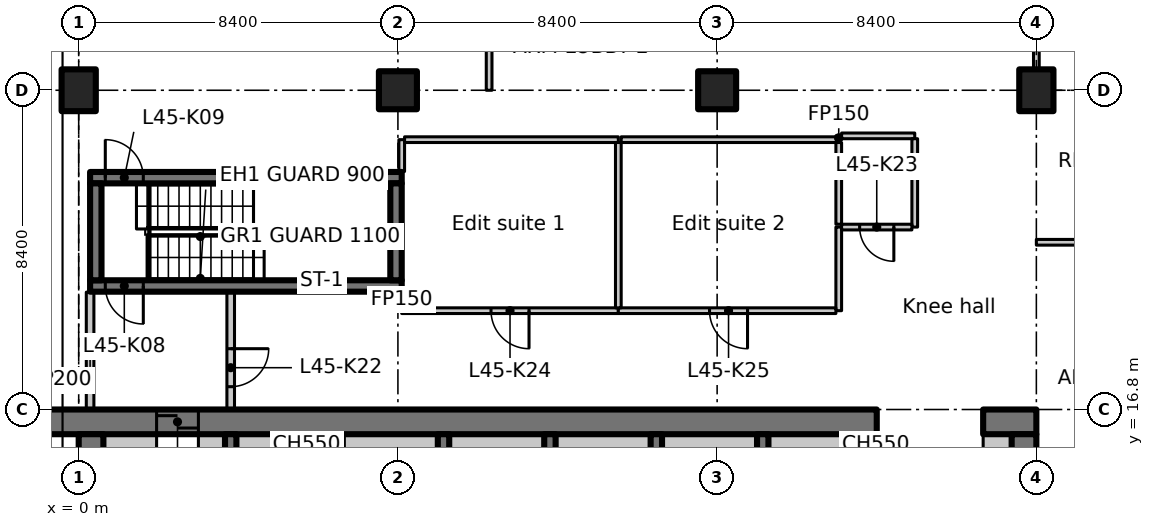
"""IFC4 building model, lengths in metres.
Left out: names, types, materials, properties, quantities, classifications, styles, units other than length and angle.
Written with IfcOpenShell. Run it as: python <this file> out.ifc"""

import sys

from ifc_helpers import new_model, si_unit, direction, frame, frame_2d, origin, origin_2d, place, context, subcontext, project, spatial, polyline, rectangle, outline, extrude, element, fill, save


model = new_model("IFC4")
c1 = context("Model", 3, precision=1e-05, world=origin(), true_north=direction((0.0, 1.0)))
c2 = subcontext(c1, "Body", "Model", "MODEL_VIEW")
j1 = project(units=[si_unit("LENGTHUNIT", "METRE"), si_unit("PLANEANGLEUNIT", "RADIAN")], contexts=[c1])
p1 = place(None, origin())
s1 = spatial("IfcSite", under=j1, at=p1, CompositionType="ELEMENT")
p2 = place(p1, origin())
s2 = spatial("IfcBuilding", under=s1, at=p2, CompositionType="ELEMENT")
p3 = place(p2, frame((0.0, 0.0, 181.2)))
s3 = spatial("IfcBuildingStorey", under=s2, at=p3, CompositionType="ELEMENT", Elevation=181.2)
p4 = place(p3, frame((0.0, 25.2, 0.0), z_axis=(0.0, 0.0, 1.0), x_axis=(1.0, 0.0, 0.0)))
e1 = element("IfcColumn", 1, at=p4, inside=s3, PredefinedType="COLUMN", context=c2, shape_type="SweptSolid", body=[
    extrude(rectangle(XDim=0.9, YDim=1.1, at=origin_2d()), origin(), (0.0, 0.0, 1.0), 3.35),
])
for number, where, z_axis, x_axis in (
    (2, (8.4, 25.2, 0.0), (0.0, 0.0, 1.0), (1.0, 0.0, 0.0)),
    (3, (16.8, 25.2, 0.0), (0.0, 0.0, 1.0), (1.0, 0.0, 0.0)),
):
    element("IfcColumn", number, at=place(p3, frame(where, z_axis=z_axis, x_axis=x_axis)), inside=s3, PredefinedType="COLUMN", context=c2, shape_type="SweptSolid", body=[
        extrude(rectangle(XDim=1.0, YDim=1.0, at=origin_2d()), origin(), (0.0, 0.0, 1.0), 3.35),
    ])
p5 = place(p3, frame((25.2, 25.2, 0.0), z_axis=(0.0, 0.0, 1.0), x_axis=(1.0, 0.0, 0.0)))
e4 = element("IfcColumn", 4, at=p5, inside=s3, PredefinedType="COLUMN", context=c2, shape_type="SweptSolid", body=[
    extrude(rectangle(XDim=0.9, YDim=1.1, at=origin_2d()), origin(), (0.0, 0.0, 1.0), 3.35),
])
p6 = place(p3, frame((-1.1, 16.475, 0.0), z_axis=(0.0, 0.0, 1.0), x_axis=(1.0, 0.0, 0.0)))
e5 = element("IfcWall", 5, at=p6, inside=s3, PredefinedType="SHEAR", context=c2, shape_type="SweptSolid", body=[
    extrude(rectangle(XDim=22.1, YDim=0.65, at=frame_2d((11.05, 0.0))), origin(), (0.0, 0.0, 1.0), 3.35),
])
p7 = place(p6, frame((3.15, 0.0, 0.0)))
e6 = element("IfcOpeningElement", 6, at=p7, cuts=e5, PredefinedType="OPENING", context=c2, shape_type="SweptSolid", body=[
    extrude(rectangle(XDim=1.1, YDim=2.3, at=frame_2d((0.55, 1.15))), frame((0.0, 0.335, 0.0), z_axis=(0.0, -1.0, 0.0), x_axis=(1.0, 0.0, 0.0)), (0.0, 0.0, 1.0), 0.67),
])
p8 = place(p3, frame((23.8, 16.475, 0.0), z_axis=(0.0, 0.0, 1.0), x_axis=(1.0, 0.0, 0.0)))
e7 = element("IfcWall", 7, at=p8, inside=s3, PredefinedType="SHEAR", context=c2, shape_type="SweptSolid", body=[
    extrude(rectangle(XDim=1.4, YDim=0.65, at=frame_2d((0.7, 0.0))), origin(), (0.0, 0.0, 1.0), 3.35),
])
p9 = place(p3, frame((0.325, 7.286, 0.0), z_axis=(0.0, 0.0, 1.0), x_axis=(0.0, 1.0, 0.0)))
e8 = element("IfcWall", 8, at=p9, inside=s3, PredefinedType="SHEAR", context=c2, shape_type="SweptSolid", body=[
    extrude(rectangle(XDim=8.864, YDim=0.65, at=frame_2d((4.432, 0.0))), origin(), (0.0, 0.0, 1.0), 3.35),
])
p10 = place(p3, frame((24.875, 12.6, 0.0), z_axis=(0.0, 0.0, 1.0), x_axis=(0.0, 1.0, 0.0)))
e9 = element("IfcWall", 9, at=p10, inside=s3, PredefinedType="SHEAR", context=c2, shape_type="SweptSolid", body=[
    extrude(rectangle(XDim=3.55, YDim=0.65, at=frame_2d((1.775, 0.0))), origin(), (0.0, 0.0, 1.0), 3.35),
])
p11 = place(p3, frame((0.65, 15.875, 0.0), z_axis=(0.0, 0.0, 1.0), x_axis=(1.0, 0.0, 0.0)))
e10 = element("IfcWall", 10, at=p11, inside=s3, PredefinedType="PARTITIONING", context=c2, shape_type="SweptSolid", body=[
    extrude(rectangle(XDim=1.4, YDim=0.55, at=frame_2d((0.7, 0.0))), origin(), (0.0, 0.0, 1.0), 3.35),
])
p12 = place(p3, frame((23.8, 15.875, 0.0), z_axis=(0.0, 0.0, 1.0), x_axis=(1.0, 0.0, 0.0)))
e11 = element("IfcWall", 11, at=p12, inside=s3, PredefinedType="PARTITIONING", context=c2, shape_type="SweptSolid", body=[
    extrude(rectangle(XDim=0.75, YDim=0.55, at=frame_2d((0.375, 0.0))), origin(), (0.0, 0.0, 1.0), 3.35),
])
for number, where, z_axis, x_axis in (
    (12, (4.0, 12.95, 0.0), (0.0, 0.0, 1.0), (0.0, 1.0, 0.0)),
    (13, (6.8, 12.95, 0.0), (0.0, 0.0, 1.0), (0.0, 1.0, 0.0)),
    (14, (9.6, 12.95, 0.0), (0.0, 0.0, 1.0), (0.0, 1.0, 0.0)),
    (15, (12.4, 12.95, 0.0), (0.0, 0.0, 1.0), (0.0, 1.0, 0.0)),
    (16, (15.2, 12.95, 0.0), (0.0, 0.0, 1.0), (0.0, 1.0, 0.0)),
    (17, (18.0, 12.95, 0.0), (0.0, 0.0, 1.0), (0.0, 1.0, 0.0)),
    (18, (20.8, 12.95, 0.0), (0.0, 0.0, 1.0), (0.0, 1.0, 0.0)),
):
    element("IfcWall", number, at=place(p3, frame(where, z_axis=z_axis, x_axis=x_axis)), inside=s3, PredefinedType="SHEAR", context=c2, shape_type="SweptSolid", body=[
        extrude(rectangle(XDim=3.2, YDim=0.3, at=frame_2d((1.6, 0.0))), origin(), (0.0, 0.0, 1.0), 3.35),
    ])
p13 = place(p3, frame((8.5, 20.05, 0.0), z_axis=(0.0, 0.0, 1.0), x_axis=(-1.0, 0.0, 0.0)))
e19 = element("IfcWall", 19, at=p13, inside=s3, PredefinedType="SHEAR", context=c2, shape_type="SweptSolid", body=[
    extrude(rectangle(XDim=8.2, YDim=0.3, at=frame_2d((4.1, 0.0))), origin(), (0.0, 0.0, 1.0), 3.35),
])
p14 = place(p13, frame((6.8, 0.0, 0.0)))
e20 = element("IfcOpeningElement", 20, at=p14, cuts=e19, PredefinedType="OPENING", context=c2, shape_type="SweptSolid", body=[
    extrude(rectangle(XDim=1.0, YDim=2.1, at=frame_2d((0.5, 1.05))), frame((0.0, 0.16, 0.0), z_axis=(0.0, -1.0, 0.0), x_axis=(1.0, 0.0, 0.0)), (0.0, 0.0, 1.0), 0.32),
])
p15 = place(p3, frame((0.3, 22.9, 0.0), z_axis=(0.0, 0.0, 1.0), x_axis=(1.0, 0.0, 0.0)))
e21 = element("IfcWall", 21, at=p15, inside=s3, PredefinedType="SHEAR", context=c2, shape_type="SweptSolid", body=[
    extrude(rectangle(XDim=8.2, YDim=0.3, at=frame_2d((4.1, 0.0))), origin(), (0.0, 0.0, 1.0), 3.35),
])
p16 = place(p15, frame((0.4, 0.0, 0.0)))
e22 = element("IfcOpeningElement", 22, at=p16, cuts=e21, PredefinedType="OPENING", context=c2, shape_type="SweptSolid", body=[
    extrude(rectangle(XDim=1.0, YDim=2.1, at=frame_2d((0.5, 1.05))), frame((0.0, 0.16, 0.0), z_axis=(0.0, -1.0, 0.0), x_axis=(1.0, 0.0, 0.0)), (0.0, 0.0, 1.0), 0.32),
])
for number, where, z_axis, x_axis in (
    (23, (0.45, 20.2, 0.0), (0.0, 0.0, 1.0), (0.0, 1.0, 0.0)),
    (24, (8.35, 20.2, 0.0), (0.0, 0.0, 1.0), (0.0, 1.0, 0.0)),
):
    element("IfcWall", number, at=place(p3, frame(where, z_axis=z_axis, x_axis=x_axis)), inside=s3, PredefinedType="SHEAR", context=c2, shape_type="SweptSolid", body=[
        extrude(rectangle(XDim=2.55, YDim=0.3, at=frame_2d((1.275, 0.0))), origin(), (0.0, 0.0, 1.0), 3.35),
    ])
p17 = place(p3, frame((0.3, 16.812, 0.0), z_axis=(0.0, 0.0, 1.0), x_axis=(0.0, 1.0, 0.0)))
e25 = element("IfcWall", 25, at=p17, inside=s3, PredefinedType="PARTITIONING", context=c2, shape_type="SweptSolid", body=[
    extrude(rectangle(XDim=3.076, YDim=0.2, at=frame_2d((1.538, 0.0))), origin(), (0.0, 0.0, 1.0), 2.98),
])
p18 = place(p3, frame((4.0, 19.888, 0.0), z_axis=(0.0, 0.0, 1.0), x_axis=(0.0, -1.0, 0.0)))
e26 = element("IfcWall", 26, at=p18, inside=s3, PredefinedType="PARTITIONING", context=c2, shape_type="SweptSolid", body=[
    extrude(rectangle(XDim=3.076, YDim=0.2, at=frame_2d((1.538, 0.0))), origin(), (0.0, 0.0, 1.0), 3.35),
])
p19 = place(p18, frame((1.488, 0.0, 0.0)))
e27 = element("IfcOpeningElement", 27, at=p19, cuts=e26, PredefinedType="OPENING", context=c2, shape_type="SweptSolid", body=[
    extrude(rectangle(XDim=1.0, YDim=2.1, at=frame_2d((0.5, 1.05))), frame((0.0, 0.11, 0.0), z_axis=(0.0, -1.0, 0.0), x_axis=(1.0, 0.0, 0.0)), (0.0, 0.0, 1.0), 0.22),
])
p20 = place(p3, frame((14.2, 19.4, 0.0), z_axis=(0.0, 0.0, 1.0), x_axis=(-1.0, 0.0, 0.0)))
e28 = element("IfcWall", 28, at=p20, inside=s3, PredefinedType="PARTITIONING", context=c2, shape_type="SweptSolid", body=[
    extrude(rectangle(XDim=5.7, YDim=0.15, at=frame_2d((2.85, 0.0))), origin(), (0.0, 0.0, 1.0), 3.35),
])
p21 = place(p20, frame((2.35, 0.0, 0.0)))
e29 = element("IfcOpeningElement", 29, at=p21, cuts=e28, PredefinedType="OPENING", context=c2, shape_type="SweptSolid", body=[
    extrude(rectangle(XDim=1.0, YDim=2.1, at=frame_2d((0.5, 1.05))), frame((0.0, 0.085, 0.0), z_axis=(0.0, -1.0, 0.0), x_axis=(1.0, 0.0, 0.0)), (0.0, 0.0, 1.0), 0.17),
])
p22 = place(p3, frame((8.5, 19.475, 0.0), z_axis=(0.0, 0.0, 1.0), x_axis=(0.0, 1.0, 0.0)))
e30 = element("IfcWall", 30, at=p22, inside=s3, PredefinedType="PARTITIONING", context=c2, shape_type="SweptSolid", body=[
    extrude(rectangle(XDim=0.413, YDim=0.15, at=frame_2d((0.207, 0.0))), origin(), (0.0, 0.0, 1.0), 3.35),
])
p23 = place(p3, frame((8.5, 23.062, 0.0), z_axis=(0.0, 0.0, 1.0), x_axis=(0.0, 1.0, 0.0)))
e31 = element("IfcWall", 31, at=p23, inside=s3, PredefinedType="PARTITIONING", context=c2, shape_type="SweptSolid", body=[
    extrude(rectangle(XDim=0.838, YDim=0.15, at=frame_2d((0.419, 0.0))), origin(), (0.0, 0.0, 1.0), 3.35),
])
p24 = place(p3, frame((8.575, 23.9, 0.0), z_axis=(0.0, 0.0, 1.0), x_axis=(1.0, 0.0, 0.0)))
e32 = element("IfcWall", 32, at=p24, inside=s3, PredefinedType="PARTITIONING", context=c2, shape_type="SweptSolid", body=[
    extrude(rectangle(XDim=5.625, YDim=0.15, at=frame_2d((2.812, 0.0))), origin(), (0.0, 0.0, 1.0), 3.35),
])
p25 = place(p3, frame((20.0, 21.6, 0.0), z_axis=(0.0, 0.0, 1.0), x_axis=(0.0, -1.0, 0.0)))
e33 = element("IfcWall", 33, at=p25, inside=s3, PredefinedType="PARTITIONING", context=c2, shape_type="SweptSolid", body=[
    extrude(rectangle(XDim=2.2, YDim=0.15, at=frame_2d((1.1, 0.0))), origin(), (0.0, 0.0, 1.0), 3.35),
])
p26 = place(p3, frame((19.925, 19.4, 0.0), z_axis=(0.0, 0.0, 1.0), x_axis=(-1.0, 0.0, 0.0)))
e34 = element("IfcWall", 34, at=p26, inside=s3, PredefinedType="PARTITIONING", context=c2, shape_type="SweptSolid", body=[
    extrude(rectangle(XDim=5.725, YDim=0.15, at=frame_2d((2.863, 0.0))), origin(), (0.0, 0.0, 1.0), 3.35),
])
p27 = place(p26, frame((2.325, 0.0, 0.0)))
e35 = element("IfcOpeningElement", 35, at=p27, cuts=e34, PredefinedType="OPENING", context=c2, shape_type="SweptSolid", body=[
    extrude(rectangle(XDim=1.0, YDim=2.1, at=frame_2d((0.5, 1.05))), frame((0.0, 0.085, 0.0), z_axis=(0.0, -1.0, 0.0), x_axis=(1.0, 0.0, 0.0)), (0.0, 0.0, 1.0), 0.17),
])
p28 = place(p3, frame((14.2, 23.825, 0.0), z_axis=(0.0, 0.0, 1.0), x_axis=(0.0, -1.0, 0.0)))
e36 = element("IfcWall", 36, at=p28, inside=s3, PredefinedType="PARTITIONING", context=c2, shape_type="SweptSolid", body=[
    extrude(rectangle(XDim=4.35, YDim=0.15, at=frame_2d((2.175, 0.0))), origin(), (0.0, 0.0, 1.0), 3.35),
])
p29 = place(p3, frame((14.275, 23.9, 0.0), z_axis=(0.0, 0.0, 1.0), x_axis=(1.0, 0.0, 0.0)))
e37 = element("IfcWall", 37, at=p29, inside=s3, PredefinedType="PARTITIONING", context=c2, shape_type="SweptSolid", body=[
    extrude(rectangle(XDim=5.725, YDim=0.15, at=frame_2d((2.863, 0.0))), origin(), (0.0, 0.0, 1.0), 3.35),
])
p30 = place(p3, frame((20.0, 23.9, 0.0), z_axis=(0.0, 0.0, 1.0), x_axis=(0.0, 1.0, 0.0)))
e38 = element("IfcWall", 38, at=p30, inside=s3, PredefinedType="PARTITIONING", context=c2, shape_type="SweptSolid", body=[
    extrude(rectangle(XDim=0.1, YDim=0.15, at=frame_2d((0.05, 0.0))), origin(), (0.0, 0.0, 1.0), 3.35),
])
p31 = place(p3, frame((20.075, 24.0, 0.0), z_axis=(0.0, 0.0, 1.0), x_axis=(1.0, 0.0, 0.0)))
e39 = element("IfcWall", 39, at=p31, inside=s3, PredefinedType="PARTITIONING", context=c2, shape_type="SweptSolid", body=[
    extrude(rectangle(XDim=1.925, YDim=0.15, at=frame_2d((0.962, 0.0))), origin(), (0.0, 0.0, 1.0), 3.35),
])
p32 = place(p3, frame((22.0, 23.925, 0.0), z_axis=(0.0, 0.0, 1.0), x_axis=(0.0, -1.0, 0.0)))
e40 = element("IfcWall", 40, at=p32, inside=s3, PredefinedType="PARTITIONING", context=c2, shape_type="SweptSolid", body=[
    extrude(rectangle(XDim=2.325, YDim=0.15, at=frame_2d((1.163, 0.0))), origin(), (0.0, 0.0, 1.0), 3.35),
])
p33 = place(p3, frame((21.925, 21.6, 0.0), z_axis=(0.0, 0.0, 1.0), x_axis=(-1.0, 0.0, 0.0)))
e41 = element("IfcWall", 41, at=p33, inside=s3, PredefinedType="PARTITIONING", context=c2, shape_type="SweptSolid", body=[
    extrude(rectangle(XDim=1.85, YDim=0.15, at=frame_2d((0.925, 0.0))), origin(), (0.0, 0.0, 1.0), 3.35),
])
p34 = place(p33, frame((0.475, 0.0, 0.0)))
e42 = element("IfcOpeningElement", 42, at=p34, cuts=e41, PredefinedType="OPENING", context=c2, shape_type="SweptSolid", body=[
    extrude(rectangle(XDim=0.9, YDim=2.1, at=frame_2d((0.45, 1.05))), frame((0.0, 0.085, 0.0), z_axis=(0.0, -1.0, 0.0), x_axis=(1.0, 0.0, 0.0)), (0.0, 0.0, 1.0), 0.17),
])
p35 = place(p3, frame((20.0, 21.675, 0.0), z_axis=(0.0, 0.0, 1.0), x_axis=(0.0, 1.0, 0.0)))
e43 = element("IfcWall", 43, at=p35, inside=s3, PredefinedType="PARTITIONING", context=c2, shape_type="SweptSolid", body=[
    extrude(rectangle(XDim=2.15, YDim=0.15, at=frame_2d((1.075, 0.0))), origin(), (0.0, 0.0, 1.0), 3.35),
])
p36 = place(p3, frame((3.15, 15.875, 0.0), z_axis=(0.0, 0.0, 1.0), x_axis=(1.0, 0.0, 0.0)))
e44 = element("IfcWall", 44, at=p36, inside=s3, PredefinedType="PARTITIONING", context=c2, shape_type="SweptSolid", body=[
    extrude(rectangle(XDim=0.7, YDim=0.55, at=frame_2d((0.35, 0.0))), origin(), (0.0, 0.0, 1.0), 3.35),
])
for number, where, z_axis, x_axis in (
    (45, (4.15, 15.875, 0.0), (0.0, 0.0, 1.0), (1.0, 0.0, 0.0)),
    (46, (6.95, 15.875, 0.0), (0.0, 0.0, 1.0), (1.0, 0.0, 0.0)),
    (47, (9.75, 15.875, 0.0), (0.0, 0.0, 1.0), (1.0, 0.0, 0.0)),
    (48, (12.55, 15.875, 0.0), (0.0, 0.0, 1.0), (1.0, 0.0, 0.0)),
    (49, (15.35, 15.875, 0.0), (0.0, 0.0, 1.0), (1.0, 0.0, 0.0)),
    (50, (18.15, 15.875, 0.0), (0.0, 0.0, 1.0), (1.0, 0.0, 0.0)),
):
    element("IfcWall", number, at=place(p3, frame(where, z_axis=z_axis, x_axis=x_axis)), inside=s3, PredefinedType="PARTITIONING", context=c2, shape_type="SweptSolid", body=[
        extrude(rectangle(XDim=2.5, YDim=0.55, at=frame_2d((1.25, 0.0))), origin(), (0.0, 0.0, 1.0), 3.35),
    ])
p37 = place(p3, frame((20.95, 15.875, 0.0), z_axis=(0.0, 0.0, 1.0), x_axis=(1.0, 0.0, 0.0)))
e51 = element("IfcWall", 51, at=p37, inside=s3, PredefinedType="PARTITIONING", context=c2, shape_type="SweptSolid", body=[
    extrude(rectangle(XDim=0.05, YDim=0.55, at=frame_2d((0.025, 0.0))), origin(), (0.0, 0.0, 1.0), 3.35),
])
p38 = place(p3, frame((25.2, 21.2, 0.0), z_axis=(0.0, 0.0, 1.0), x_axis=(1.0, 0.0, 0.0)))
e52 = element("IfcWall", 52, at=p38, inside=s3, PredefinedType="PARTITIONING", context=c2, shape_type="SweptSolid", body=[
    extrude(rectangle(XDim=4.2, YDim=0.15, at=frame_2d((2.1, 0.0))), origin(), (0.0, 0.0, 1.0), 3.33),
])
p39 = place(p3, frame((25.2, 31.0, 0.0), z_axis=(0.0, 0.0, 1.0), x_axis=(0.0, -1.0, 0.0)))
e53 = element("IfcWall", 53, at=p39, inside=s3, PredefinedType="PARTITIONING", context=c2, shape_type="SweptSolid", body=[
    extrude(outline(polyline([(0.0, 0.0), (5.23, 0.0), (5.23, 2.98), (0.0, 2.98), (0.0, 0.0)])), frame((0.0, 0.075, 0.0), z_axis=(0.0, -1.0, 0.0), x_axis=(1.0, 0.0, 0.0)), (0.0, 0.0, 1.0), 0.15),
])
p40 = place(p39, frame((2.03, 0.0, 0.0)))
e54 = element("IfcOpeningElement", 54, at=p40, cuts=e53, PredefinedType="OPENING", context=c2, shape_type="SweptSolid", body=[
    extrude(rectangle(XDim=1.1, YDim=2.1, at=frame_2d((0.55, 1.05))), frame((0.0, 0.085, 0.0), z_axis=(0.0, -1.0, 0.0), x_axis=(1.0, 0.0, 0.0)), (0.0, 0.0, 1.0), 0.17),
])
p41 = place(p3, frame((10.8, 25.2, 0.0), z_axis=(0.0, 0.0, 1.0), x_axis=(0.0, 1.0, 0.0)))
e55 = element("IfcWall", 55, at=p41, inside=s3, PredefinedType="PARTITIONING", context=c2, shape_type="SweptSolid", body=[
    extrude(rectangle(XDim=8.4, YDim=0.15, at=frame_2d((4.2, 0.0))), origin(), (0.0, 0.0, 1.0), 3.33),
])
p42 = place(p41, frame((3.3, 0.0, 0.0)))
e56 = element("IfcOpeningElement", 56, at=p42, cuts=e55, PredefinedType="OPENING", context=c2, shape_type="SweptSolid", body=[
    extrude(rectangle(XDim=1.6, YDim=2.1, at=frame_2d((0.8, 1.05))), frame((0.0, 0.085, 0.0), z_axis=(0.0, -1.0, 0.0), x_axis=(1.0, 0.0, 0.0)), (0.0, 0.0, 1.0), 0.17),
])
p43 = place(p7, origin())
e57 = element("IfcDoor", 57, at=p43, inside=s3, OperationType="SLIDING_TO_LEFT", PredefinedType="DOOR", context=c2, shape_type="SweptSolid", body=[
    extrude(rectangle(XDim=1.1, YDim=2.3, at=frame_2d((0.55, 1.15))), frame((0.0, 0.025, 0.0), z_axis=(0.0, -1.0, 0.0), x_axis=(1.0, 0.0, 0.0)), (0.0, 0.0, 1.0), 0.05),
])
fill(e6, e57)
p44 = place(p14, origin())
e58 = element("IfcDoor", 58, at=p44, inside=s3, OperationType="SINGLE_SWING_LEFT", PredefinedType="DOOR", context=c2, shape_type="SweptSolid", body=[
    extrude(rectangle(XDim=1.0, YDim=2.1, at=frame_2d((0.5, 1.05))), frame((0.0, 0.025, 0.0), z_axis=(0.0, -1.0, 0.0), x_axis=(1.0, 0.0, 0.0)), (0.0, 0.0, 1.0), 0.05),
])
fill(e20, e58)
p45 = place(p16, origin())
e59 = element("IfcDoor", 59, at=p45, inside=s3, OperationType="SINGLE_SWING_RIGHT", PredefinedType="DOOR", context=c2, shape_type="SweptSolid", body=[
    extrude(rectangle(XDim=1.0, YDim=2.1, at=frame_2d((0.5, 1.05))), frame((0.0, 0.025, 0.0), z_axis=(0.0, -1.0, 0.0), x_axis=(1.0, 0.0, 0.0)), (0.0, 0.0, 1.0), 0.05),
])
fill(e22, e59)
p46 = place(p19, origin())
e60 = element("IfcDoor", 60, at=p46, inside=s3, OperationType="SINGLE_SWING_LEFT", PredefinedType="DOOR", context=c2, shape_type="SweptSolid", body=[
    extrude(rectangle(XDim=1.0, YDim=2.1, at=frame_2d((0.5, 1.05))), frame((0.0, 0.025, 0.0), z_axis=(0.0, -1.0, 0.0), x_axis=(1.0, 0.0, 0.0)), (0.0, 0.0, 1.0), 0.05),
])
fill(e27, e60)
p47 = place(p34, origin())
e61 = element("IfcDoor", 61, at=p47, inside=s3, OperationType="SINGLE_SWING_RIGHT", PredefinedType="DOOR", context=c2, shape_type="SweptSolid", body=[
    extrude(rectangle(XDim=0.9, YDim=2.1, at=frame_2d((0.45, 1.05))), frame((0.0, 0.025, 0.0), z_axis=(0.0, -1.0, 0.0), x_axis=(1.0, 0.0, 0.0)), (0.0, 0.0, 1.0), 0.05),
])
fill(e42, e61)
p48 = place(p21, origin())
e62 = element("IfcDoor", 62, at=p48, inside=s3, OperationType="SINGLE_SWING_LEFT", PredefinedType="DOOR", context=c2, shape_type="SweptSolid", body=[
    extrude(rectangle(XDim=1.0, YDim=2.1, at=frame_2d((0.5, 1.05))), frame((0.0, 0.025, 0.0), z_axis=(0.0, -1.0, 0.0), x_axis=(1.0, 0.0, 0.0)), (0.0, 0.0, 1.0), 0.05),
])
fill(e29, e62)
p49 = place(p27, origin())
e63 = element("IfcDoor", 63, at=p49, inside=s3, OperationType="SINGLE_SWING_RIGHT", PredefinedType="DOOR", context=c2, shape_type="SweptSolid", body=[
    extrude(rectangle(XDim=1.0, YDim=2.1, at=frame_2d((0.5, 1.05))), frame((0.0, 0.025, 0.0), z_axis=(0.0, -1.0, 0.0), x_axis=(1.0, 0.0, 0.0)), (0.0, 0.0, 1.0), 0.05),
])
fill(e35, e63)
save(model, sys.argv[1])
